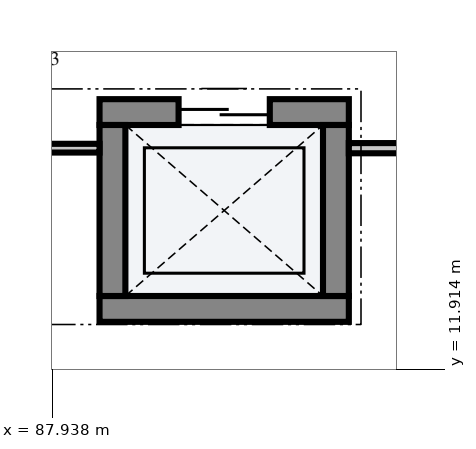
"""IFC4 building model, lengths in metres.
Left out: names, types, materials, properties, quantities, classifications, styles, units other than length and angle.
Written with IfcOpenShell. Run it as: python <this file> out.ifc"""

import sys

from ifc_helpers import new_model, si_unit, direction, frame, frame_2d, origin, place, context, subcontext, project, spatial, rectangle, extrude, element, fill, save


model = new_model("IFC4")
c1 = context("Model", 3, precision=1e-05, world=origin(), true_north=direction((0.0, 1.0)))
c2 = subcontext(c1, "Body", "Model", "MODEL_VIEW")
j1 = project(units=[si_unit("LENGTHUNIT", "METRE"), si_unit("PLANEANGLEUNIT", "RADIAN")], contexts=[c1])
p1 = place(None, origin())
s1 = spatial("IfcSite", under=j1, at=p1, CompositionType="ELEMENT")
p2 = place(p1, origin())
s2 = spatial("IfcBuilding", under=s1, at=p2, CompositionType="ELEMENT")
p3 = place(p2, frame((0.0, 0.0, 10.2)))
s3 = spatial("IfcBuildingStorey", under=s2, at=p3, CompositionType="ELEMENT", Elevation=10.2)
p4 = place(p3, frame((88.56, 12.705, 0.0), z_axis=(0.0, 0.0, 1.0), x_axis=(1.0, 0.0, 0.0)))
e1 = element("IfcWall", 1, at=p4, inside=s3, PredefinedType="SHEAR", context=c2, shape_type="SweptSolid", body=[
    extrude(rectangle(XDim=3.28, YDim=0.34, at=frame_2d((1.64, 0.0))), origin(), (0.0, 0.0, 1.0), 4.515),
])
p5 = place(p3, frame((88.56, 15.295, 0.0), z_axis=(0.0, 0.0, 1.0), x_axis=(1.0, 0.0, 0.0)))
e2 = element("IfcWall", 2, at=p5, inside=s3, PredefinedType="SHEAR", context=c2, shape_type="SweptSolid", body=[
    extrude(rectangle(XDim=3.28, YDim=0.34, at=frame_2d((1.64, 0.0))), origin(), (0.0, 0.0, 1.0), 4.515),
])
p6 = place(p5, frame((1.04, 0.0, 0.0)))
e3 = element("IfcOpeningElement", 3, at=p6, cuts=e2, PredefinedType="OPENING", context=c2, shape_type="SweptSolid", body=[
    extrude(rectangle(XDim=1.2, YDim=2.2, at=frame_2d((0.6, 1.1))), frame((0.0, 0.182, 0.0), z_axis=(0.0, -1.0, 0.0), x_axis=(1.0, 0.0, 0.0)), (0.0, 0.0, 1.0), 0.364),
])
for number, where, z_axis, x_axis in (
    (4, (88.73, 12.875, 0.0), (0.0, 0.0, 1.0), (0.0, 1.0, 0.0)),
    (5, (91.67, 12.875, 0.0), (0.0, 0.0, 1.0), (0.0, 1.0, 0.0)),
):
    element("IfcWall", number, at=place(p3, frame(where, z_axis=z_axis, x_axis=x_axis)), inside=s3, PredefinedType="SHEAR", context=c2, shape_type="SweptSolid", body=[
        extrude(rectangle(XDim=2.25, YDim=0.34, at=frame_2d((1.125, 0.0))), origin(), (0.0, 0.0, 1.0), 4.515),
    ])
p7 = place(p3, frame((91.84, 14.82, 0.0), z_axis=(0.0, 0.0, 1.0), x_axis=(1.0, 0.0, 0.0)))
e6 = element("IfcWall", 6, at=p7, inside=s3, PredefinedType="PARTITIONING", context=c2, shape_type="SweptSolid", body=[
    extrude(rectangle(XDim=42.394, YDim=0.134, at=frame_2d((21.197, 0.0))), origin(), (0.0, 0.0, 1.0), 3.455),
])
p8 = place(p7, frame((20.153, 0.0, 0.0)))
e7 = element("IfcOpeningElement", 7, at=p8, cuts=e6, PredefinedType="OPENING", context=c2, shape_type="SweptSolid", body=[
    extrude(rectangle(XDim=1.64, YDim=2.28, at=frame_2d((0.82, 1.14))), frame((0.0, 0.079, 0.0), z_axis=(0.0, -1.0, 0.0), x_axis=(1.0, 0.0, 0.0)), (0.0, 0.0, 1.0), 0.158),
])
p9 = place(p3, frame((84.44, 14.82, 0.0), z_axis=(0.0, 0.0, 1.0), x_axis=(1.0, 0.0, 0.0)))
e8 = element("IfcWall", 8, at=p9, inside=s3, PredefinedType="PARTITIONING", context=c2, shape_type="SweptSolid", body=[
    extrude(rectangle(XDim=4.12, YDim=0.115, at=frame_2d((2.06, 0.0))), origin(), (0.0, 0.0, 1.0), 3.455),
])
p10 = place(p6, origin())
e9 = element("IfcDoor", 9, at=p10, inside=s3, OperationType="DOUBLE_DOOR_SLIDING", PredefinedType="DOOR", context=c2, shape_type="SweptSolid", body=[
    extrude(rectangle(XDim=1.2, YDim=2.2, at=frame_2d((0.6, 1.1))), frame((0.0, 0.025, 0.0), z_axis=(0.0, -1.0, 0.0), x_axis=(1.0, 0.0, 0.0)), (0.0, 0.0, 1.0), 0.05),
])
fill(e3, e9)
save(model, sys.argv[1])
